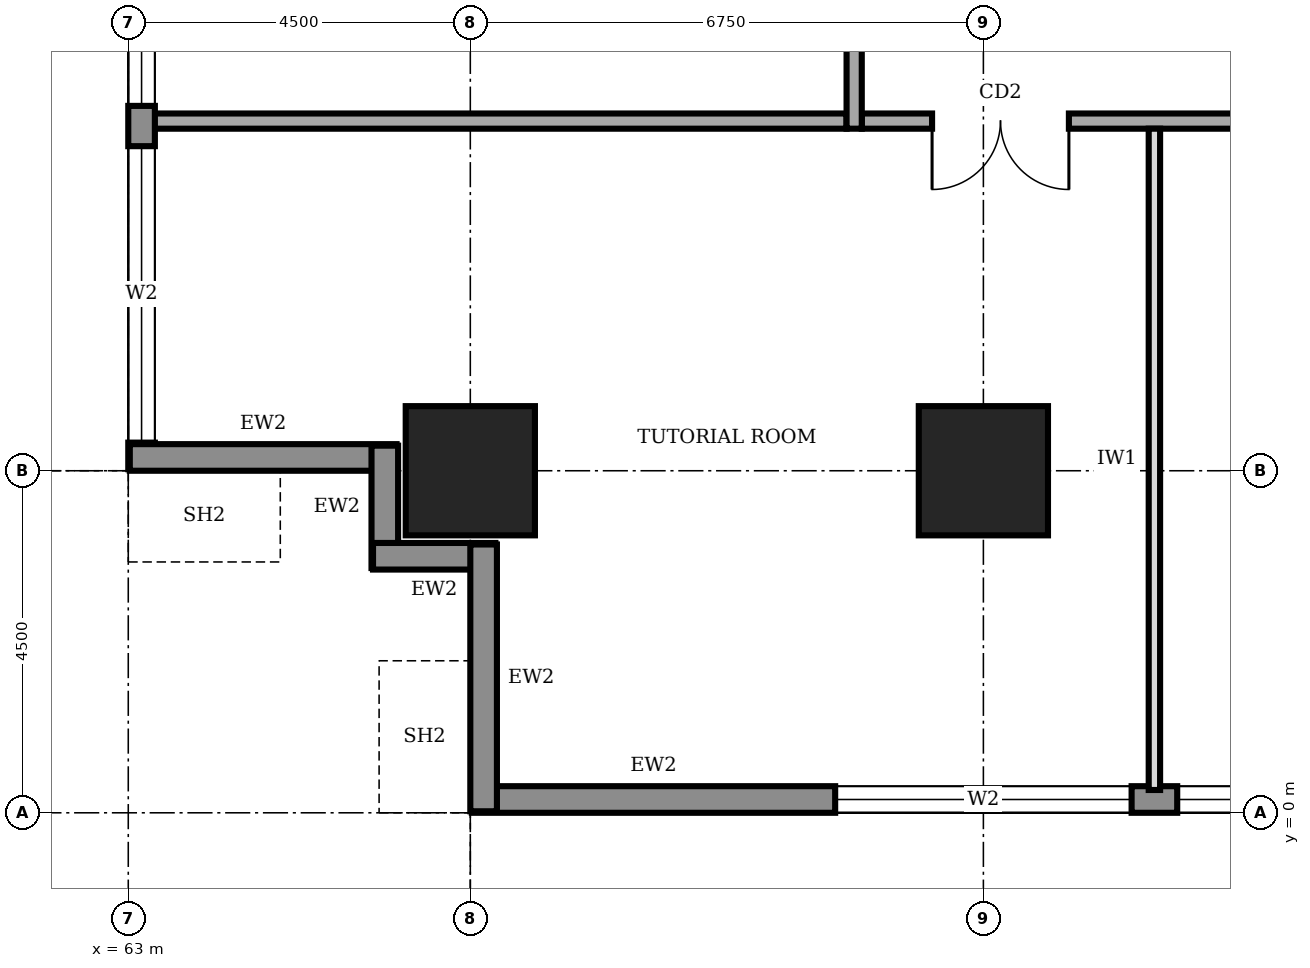
"""IFC4 building model, lengths in metres.
Left out: names, types, materials, properties, quantities, classifications, styles, units other than length and angle.
Written with IfcOpenShell. Run it as: python <this file> out.ifc"""

import sys

from ifc_helpers import new_model, si_unit, direction, frame, frame_2d, origin, origin_2d, place, context, subcontext, project, spatial, rectangle, extrude, element, fill, save


model = new_model("IFC4")
c1 = context("Model", 3, precision=1e-05, world=origin(), true_north=direction((0.0, 1.0)))
c2 = subcontext(c1, "Body", "Model", "MODEL_VIEW")
j1 = project(units=[si_unit("LENGTHUNIT", "METRE"), si_unit("PLANEANGLEUNIT", "RADIAN")], contexts=[c1])
p1 = place(None, origin())
s1 = spatial("IfcSite", under=j1, at=p1, CompositionType="ELEMENT")
p2 = place(p1, origin())
s2 = spatial("IfcBuilding", under=s1, at=p2, CompositionType="ELEMENT")
p3 = place(p2, frame((0.0, 0.0, 73.0)))
s3 = spatial("IfcBuildingStorey", under=s2, at=p3, CompositionType="ELEMENT", Elevation=73.0)
for number, where, z_axis, x_axis in (
    (1, (67.5, 4.5, 0.0), (0.0, 0.0, 1.0), (1.0, 0.0, 0.0)),
    (2, (74.25, 4.5, 0.0), (0.0, 0.0, 1.0), (1.0, 0.0, 0.0)),
):
    element("IfcColumn", number, at=place(p3, frame(where, z_axis=z_axis, x_axis=x_axis)), inside=s3, PredefinedType="COLUMN", context=c2, shape_type="SweptSolid", body=[
        extrude(rectangle(XDim=1.7, YDim=1.7, at=origin_2d()), origin(), (0.0, 0.0, 1.0), 4.0),
    ])
p4 = place(p3, frame((67.52, 0.175, 0.0), z_axis=(0.0, 0.0, 1.0), x_axis=(1.0, 0.0, 0.0)))
e3 = element("IfcWall", 3, at=p4, inside=s3, PredefinedType="STANDARD", context=c2, shape_type="SweptSolid", body=[
    extrude(rectangle(XDim=26.96, YDim=0.35, at=frame_2d((13.48, 0.0))), origin(), (0.0, 0.0, 1.0), 3.75),
])
p5 = place(p4, frame((4.78, 0.0, 0.6)))
e4 = element("IfcOpeningElement", 4, at=p5, cuts=e3, PredefinedType="OPENING", context=c2, shape_type="SweptSolid", body=[
    extrude(rectangle(XDim=3.9, YDim=2.6, at=frame_2d((1.95, 1.3))), frame((0.0, 0.185, 0.0), z_axis=(0.0, -1.0, 0.0), x_axis=(1.0, 0.0, 0.0)), (0.0, 0.0, 1.0), 0.37),
])
p6 = place(p4, frame((9.28, 0.0, 0.6)))
e5 = element("IfcOpeningElement", 5, at=p6, cuts=e3, PredefinedType="OPENING", context=c2, shape_type="SweptSolid", body=[
    extrude(rectangle(XDim=3.9, YDim=2.6, at=frame_2d((1.95, 1.3))), frame((0.0, 0.185, 0.0), z_axis=(0.0, -1.0, 0.0), x_axis=(1.0, 0.0, 0.0)), (0.0, 0.0, 1.0), 0.37),
])
p7 = place(p4, frame((13.78, 0.0, 0.6)))
e6 = element("IfcOpeningElement", 6, at=p7, cuts=e3, PredefinedType="OPENING", context=c2, shape_type="SweptSolid", body=[
    extrude(rectangle(XDim=3.9, YDim=2.6, at=frame_2d((1.95, 1.3))), frame((0.0, 0.185, 0.0), z_axis=(0.0, -1.0, 0.0), x_axis=(1.0, 0.0, 0.0)), (0.0, 0.0, 1.0), 0.37),
])
p8 = place(p4, frame((18.28, 0.0, 0.6)))
e7 = element("IfcOpeningElement", 7, at=p8, cuts=e3, PredefinedType="OPENING", context=c2, shape_type="SweptSolid", body=[
    extrude(rectangle(XDim=3.9, YDim=2.6, at=frame_2d((1.95, 1.3))), frame((0.0, 0.185, 0.0), z_axis=(0.0, -1.0, 0.0), x_axis=(1.0, 0.0, 0.0)), (0.0, 0.0, 1.0), 0.37),
])
p9 = place(p4, frame((22.71, 0.0, 0.6)))
e8 = element("IfcOpeningElement", 8, at=p9, cuts=e3, PredefinedType="OPENING", context=c2, shape_type="SweptSolid", body=[
    extrude(rectangle(XDim=3.9, YDim=2.6, at=frame_2d((1.95, 1.3))), frame((0.0, 0.185, 0.0), z_axis=(0.0, -1.0, 0.0), x_axis=(1.0, 0.0, 0.0)), (0.0, 0.0, 1.0), 0.37),
])
p10 = place(p3, frame((63.175, 35.98, 0.0), z_axis=(0.0, 0.0, 1.0), x_axis=(0.0, -1.0, 0.0)))
e9 = element("IfcWall", 9, at=p10, inside=s3, PredefinedType="STANDARD", context=c2, shape_type="SweptSolid", body=[
    extrude(rectangle(XDim=31.46, YDim=0.35, at=frame_2d((15.73, 0.0))), origin(), (0.0, 0.0, 1.0), 3.75),
])
p11 = place(p10, frame((27.21, 0.0, 0.6)))
e10 = element("IfcOpeningElement", 10, at=p11, cuts=e9, PredefinedType="OPENING", context=c2, shape_type="SweptSolid", body=[
    extrude(rectangle(XDim=3.9, YDim=2.6, at=frame_2d((1.95, 1.3))), frame((0.0, 0.185, 0.0), z_axis=(0.0, -1.0, 0.0), x_axis=(1.0, 0.0, 0.0)), (0.0, 0.0, 1.0), 0.37),
])
p12 = place(p10, frame((22.78, 0.0, 0.6)))
e11 = element("IfcOpeningElement", 11, at=p12, cuts=e9, PredefinedType="OPENING", context=c2, shape_type="SweptSolid", body=[
    extrude(rectangle(XDim=3.9, YDim=2.6, at=frame_2d((1.95, 1.3))), frame((0.0, 0.185, 0.0), z_axis=(0.0, -1.0, 0.0), x_axis=(1.0, 0.0, 0.0)), (0.0, 0.0, 1.0), 0.37),
])
p13 = place(p10, frame((18.28, 0.0, 0.6)))
e12 = element("IfcOpeningElement", 12, at=p13, cuts=e9, PredefinedType="OPENING", context=c2, shape_type="SweptSolid", body=[
    extrude(rectangle(XDim=3.9, YDim=2.6, at=frame_2d((1.95, 1.3))), frame((0.0, 0.185, 0.0), z_axis=(0.0, -1.0, 0.0), x_axis=(1.0, 0.0, 0.0)), (0.0, 0.0, 1.0), 0.37),
])
p14 = place(p10, frame((13.78, 0.0, 0.6)))
e13 = element("IfcOpeningElement", 13, at=p14, cuts=e9, PredefinedType="OPENING", context=c2, shape_type="SweptSolid", body=[
    extrude(rectangle(XDim=3.9, YDim=2.6, at=frame_2d((1.95, 1.3))), frame((0.0, 0.185, 0.0), z_axis=(0.0, -1.0, 0.0), x_axis=(1.0, 0.0, 0.0)), (0.0, 0.0, 1.0), 0.37),
])
p15 = place(p10, frame((9.28, 0.0, 0.6)))
e14 = element("IfcOpeningElement", 14, at=p15, cuts=e9, PredefinedType="OPENING", context=c2, shape_type="SweptSolid", body=[
    extrude(rectangle(XDim=3.9, YDim=2.6, at=frame_2d((1.95, 1.3))), frame((0.0, 0.185, 0.0), z_axis=(0.0, -1.0, 0.0), x_axis=(1.0, 0.0, 0.0)), (0.0, 0.0, 1.0), 0.37),
])
p16 = place(p10, frame((4.78, 0.0, 0.6)))
e15 = element("IfcOpeningElement", 15, at=p16, cuts=e9, PredefinedType="OPENING", context=c2, shape_type="SweptSolid", body=[
    extrude(rectangle(XDim=3.9, YDim=2.6, at=frame_2d((1.95, 1.3))), frame((0.0, 0.185, 0.0), z_axis=(0.0, -1.0, 0.0), x_axis=(1.0, 0.0, 0.0)), (0.0, 0.0, 1.0), 0.37),
])
p17 = place(p3, frame((63.02, 4.675, 0.0), z_axis=(0.0, 0.0, 1.0), x_axis=(1.0, 0.0, 0.0)))
e16 = element("IfcWall", 16, at=p17, inside=s3, PredefinedType="STANDARD", context=c2, shape_type="SweptSolid", body=[
    extrude(rectangle(XDim=3.51, YDim=0.35, at=frame_2d((1.755, 0.0))), origin(), (0.0, 0.0, 1.0), 2.75),
])
for number, where, z_axis, x_axis in (
    (17, (66.375, 4.83, 0.0), (0.0, 0.0, 1.0), (0.0, -1.0, 0.0)),
    (18, (66.22, 3.375, 0.0), (0.0, 0.0, 1.0), (1.0, 0.0, 0.0)),
):
    element("IfcWall", number, at=place(p3, frame(where, z_axis=z_axis, x_axis=x_axis)), inside=s3, PredefinedType="STANDARD", context=c2, shape_type="SweptSolid", body=[
        extrude(rectangle(XDim=1.61, YDim=0.35, at=frame_2d((0.805, 0.0))), origin(), (0.0, 0.0, 1.0), 3.75),
    ])
p18 = place(p3, frame((67.675, 3.53, 0.0), z_axis=(0.0, 0.0, 1.0), x_axis=(0.0, -1.0, 0.0)))
e19 = element("IfcWall", 19, at=p18, inside=s3, PredefinedType="STANDARD", context=c2, shape_type="SweptSolid", body=[
    extrude(rectangle(XDim=3.51, YDim=0.35, at=frame_2d((1.755, 0.0))), origin(), (0.0, 0.0, 1.0), 2.75),
])
p19 = place(p3, frame((72.65, 9.1, 0.0), z_axis=(0.0, 0.0, 1.0), x_axis=(1.0, 0.0, 0.0)))
e20 = element("IfcWall", 20, at=p19, inside=s3, PredefinedType="SOLIDWALL", context=c2, shape_type="SweptSolid", body=[
    extrude(rectangle(XDim=16.9, YDim=0.2, at=frame_2d((8.45, 0.0))), origin(), (0.0, 0.0, 1.0), 3.75),
])
p20 = place(p19, frame((0.925, 0.0, 0.0)))
e21 = element("IfcOpeningElement", 21, at=p20, cuts=e20, PredefinedType="OPENING", context=c2, shape_type="SweptSolid", body=[
    extrude(rectangle(XDim=1.8, YDim=2.1, at=frame_2d((0.9, 1.05))), frame((0.0, 0.11, 0.0), z_axis=(0.0, -1.0, 0.0), x_axis=(1.0, 0.0, 0.0)), (0.0, 0.0, 1.0), 0.22),
])
p21 = place(p19, frame((7.85, 0.0, 0.0)))
e22 = element("IfcOpeningElement", 22, at=p21, cuts=e20, PredefinedType="OPENING", context=c2, shape_type="SweptSolid", body=[
    extrude(rectangle(XDim=1.0, YDim=2.1, at=frame_2d((0.5, 1.05))), frame((0.0, 0.11, 0.0), z_axis=(0.0, -1.0, 0.0), x_axis=(1.0, 0.0, 0.0)), (0.0, 0.0, 1.0), 0.22),
])
p22 = place(p19, frame((13.975, 0.0, 0.0)))
e23 = element("IfcOpeningElement", 23, at=p22, cuts=e20, PredefinedType="OPENING", context=c2, shape_type="SweptSolid", body=[
    extrude(rectangle(XDim=1.8, YDim=2.1, at=frame_2d((0.9, 1.05))), frame((0.0, 0.11, 0.0), z_axis=(0.0, -1.0, 0.0), x_axis=(1.0, 0.0, 0.0)), (0.0, 0.0, 1.0), 0.22),
])
p23 = place(p3, frame((72.55, 31.3, 0.0), z_axis=(0.0, 0.0, 1.0), x_axis=(0.0, -1.0, 0.0)))
e24 = element("IfcWall", 24, at=p23, inside=s3, PredefinedType="SOLIDWALL", context=c2, shape_type="SweptSolid", body=[
    extrude(rectangle(XDim=22.3, YDim=0.2, at=frame_2d((11.15, 0.0))), origin(), (0.0, 0.0, 1.0), 3.75),
])
p24 = place(p23, frame((19.55, 0.0, 0.0)))
e25 = element("IfcOpeningElement", 25, at=p24, cuts=e24, PredefinedType="OPENING", context=c2, shape_type="SweptSolid", body=[
    extrude(rectangle(XDim=1.0, YDim=2.1, at=frame_2d((0.5, 1.05))), frame((0.0, 0.11, 0.0), z_axis=(0.0, -1.0, 0.0), x_axis=(1.0, 0.0, 0.0)), (0.0, 0.0, 1.0), 0.22),
])
p25 = place(p23, frame((12.8, 0.0, 0.0)))
e26 = element("IfcOpeningElement", 26, at=p25, cuts=e24, PredefinedType="OPENING", context=c2, shape_type="SweptSolid", body=[
    extrude(rectangle(XDim=1.0, YDim=2.1, at=frame_2d((0.5, 1.05))), frame((0.0, 0.11, 0.0), z_axis=(0.0, -1.0, 0.0), x_axis=(1.0, 0.0, 0.0)), (0.0, 0.0, 1.0), 0.22),
])
p26 = place(p23, frame((6.05, 0.0, 0.0)))
e27 = element("IfcOpeningElement", 27, at=p26, cuts=e24, PredefinedType="OPENING", context=c2, shape_type="SweptSolid", body=[
    extrude(rectangle(XDim=1.0, YDim=2.1, at=frame_2d((0.5, 1.05))), frame((0.0, 0.11, 0.0), z_axis=(0.0, -1.0, 0.0), x_axis=(1.0, 0.0, 0.0)), (0.0, 0.0, 1.0), 0.22),
])
p27 = place(p23, frame((1.55, 0.0, 0.0)))
e28 = element("IfcOpeningElement", 28, at=p27, cuts=e24, PredefinedType="OPENING", context=c2, shape_type="SweptSolid", body=[
    extrude(rectangle(XDim=1.0, YDim=2.1, at=frame_2d((0.5, 1.05))), frame((0.0, 0.11, 0.0), z_axis=(0.0, -1.0, 0.0), x_axis=(1.0, 0.0, 0.0)), (0.0, 0.0, 1.0), 0.22),
])
p28 = place(p3, frame((63.3, 9.1, 0.0), z_axis=(0.0, 0.0, 1.0), x_axis=(1.0, 0.0, 0.0)))
e29 = element("IfcWall", 29, at=p28, inside=s3, PredefinedType="SOLIDWALL", context=c2, shape_type="SweptSolid", body=[
    extrude(rectangle(XDim=9.15, YDim=0.2, at=frame_2d((4.575, 0.0))), origin(), (0.0, 0.0, 1.0), 3.75),
])
p29 = place(p3, frame((76.5, 0.3, 0.0), z_axis=(0.0, 0.0, 1.0), x_axis=(0.0, 1.0, 0.0)))
e30 = element("IfcWall", 30, at=p29, inside=s3, PredefinedType="PARTITIONING", context=c2, shape_type="SweptSolid", body=[
    extrude(rectangle(XDim=8.7, YDim=0.15, at=frame_2d((4.35, 0.0))), origin(), (0.0, 0.0, 1.0), 3.75),
])
p30 = place(p5, origin())
e31 = element("IfcWindow", 31, at=p30, inside=s3, PartitioningType="SINGLE_PANEL", PredefinedType="WINDOW", context=c2, shape_type="SweptSolid", body=[
    extrude(rectangle(XDim=3.9, YDim=2.6, at=frame_2d((1.95, 1.3))), frame((0.0, 0.03, 0.0), z_axis=(0.0, -1.0, 0.0), x_axis=(1.0, 0.0, 0.0)), (0.0, 0.0, 1.0), 0.06),
])
fill(e4, e31)
p31 = place(p6, origin())
e32 = element("IfcWindow", 32, at=p31, inside=s3, PartitioningType="SINGLE_PANEL", PredefinedType="WINDOW", context=c2, shape_type="SweptSolid", body=[
    extrude(rectangle(XDim=3.9, YDim=2.6, at=frame_2d((1.95, 1.3))), frame((0.0, 0.03, 0.0), z_axis=(0.0, -1.0, 0.0), x_axis=(1.0, 0.0, 0.0)), (0.0, 0.0, 1.0), 0.06),
])
fill(e5, e32)
p32 = place(p11, origin())
e33 = element("IfcWindow", 33, at=p32, inside=s3, PartitioningType="SINGLE_PANEL", PredefinedType="WINDOW", context=c2, shape_type="SweptSolid", body=[
    extrude(rectangle(XDim=3.9, YDim=2.6, at=frame_2d((1.95, 1.3))), frame((0.0, 0.03, 0.0), z_axis=(0.0, -1.0, 0.0), x_axis=(1.0, 0.0, 0.0)), (0.0, 0.0, 1.0), 0.06),
])
fill(e10, e33)
p33 = place(p12, origin())
e34 = element("IfcWindow", 34, at=p33, inside=s3, PartitioningType="SINGLE_PANEL", PredefinedType="WINDOW", context=c2, shape_type="SweptSolid", body=[
    extrude(rectangle(XDim=3.9, YDim=2.6, at=frame_2d((1.95, 1.3))), frame((0.0, 0.03, 0.0), z_axis=(0.0, -1.0, 0.0), x_axis=(1.0, 0.0, 0.0)), (0.0, 0.0, 1.0), 0.06),
])
fill(e11, e34)
p34 = place(p20, frame((1.8, 0.0, 0.0), z_axis=(0.0, 0.0, 1.0), x_axis=(-1.0, 0.0, 0.0)))
e35 = element("IfcDoor", 35, at=p34, inside=s3, OperationType="DOUBLE_DOOR_SINGLE_SWING", PredefinedType="DOOR", context=c2, shape_type="SweptSolid", body=[
    extrude(rectangle(XDim=1.8, YDim=2.1, at=frame_2d((0.9, 1.05))), frame((0.0, 0.025, 0.0), z_axis=(0.0, -1.0, 0.0), x_axis=(1.0, 0.0, 0.0)), (0.0, 0.0, 1.0), 0.05),
])
fill(e21, e35)
save(model, sys.argv[1])
